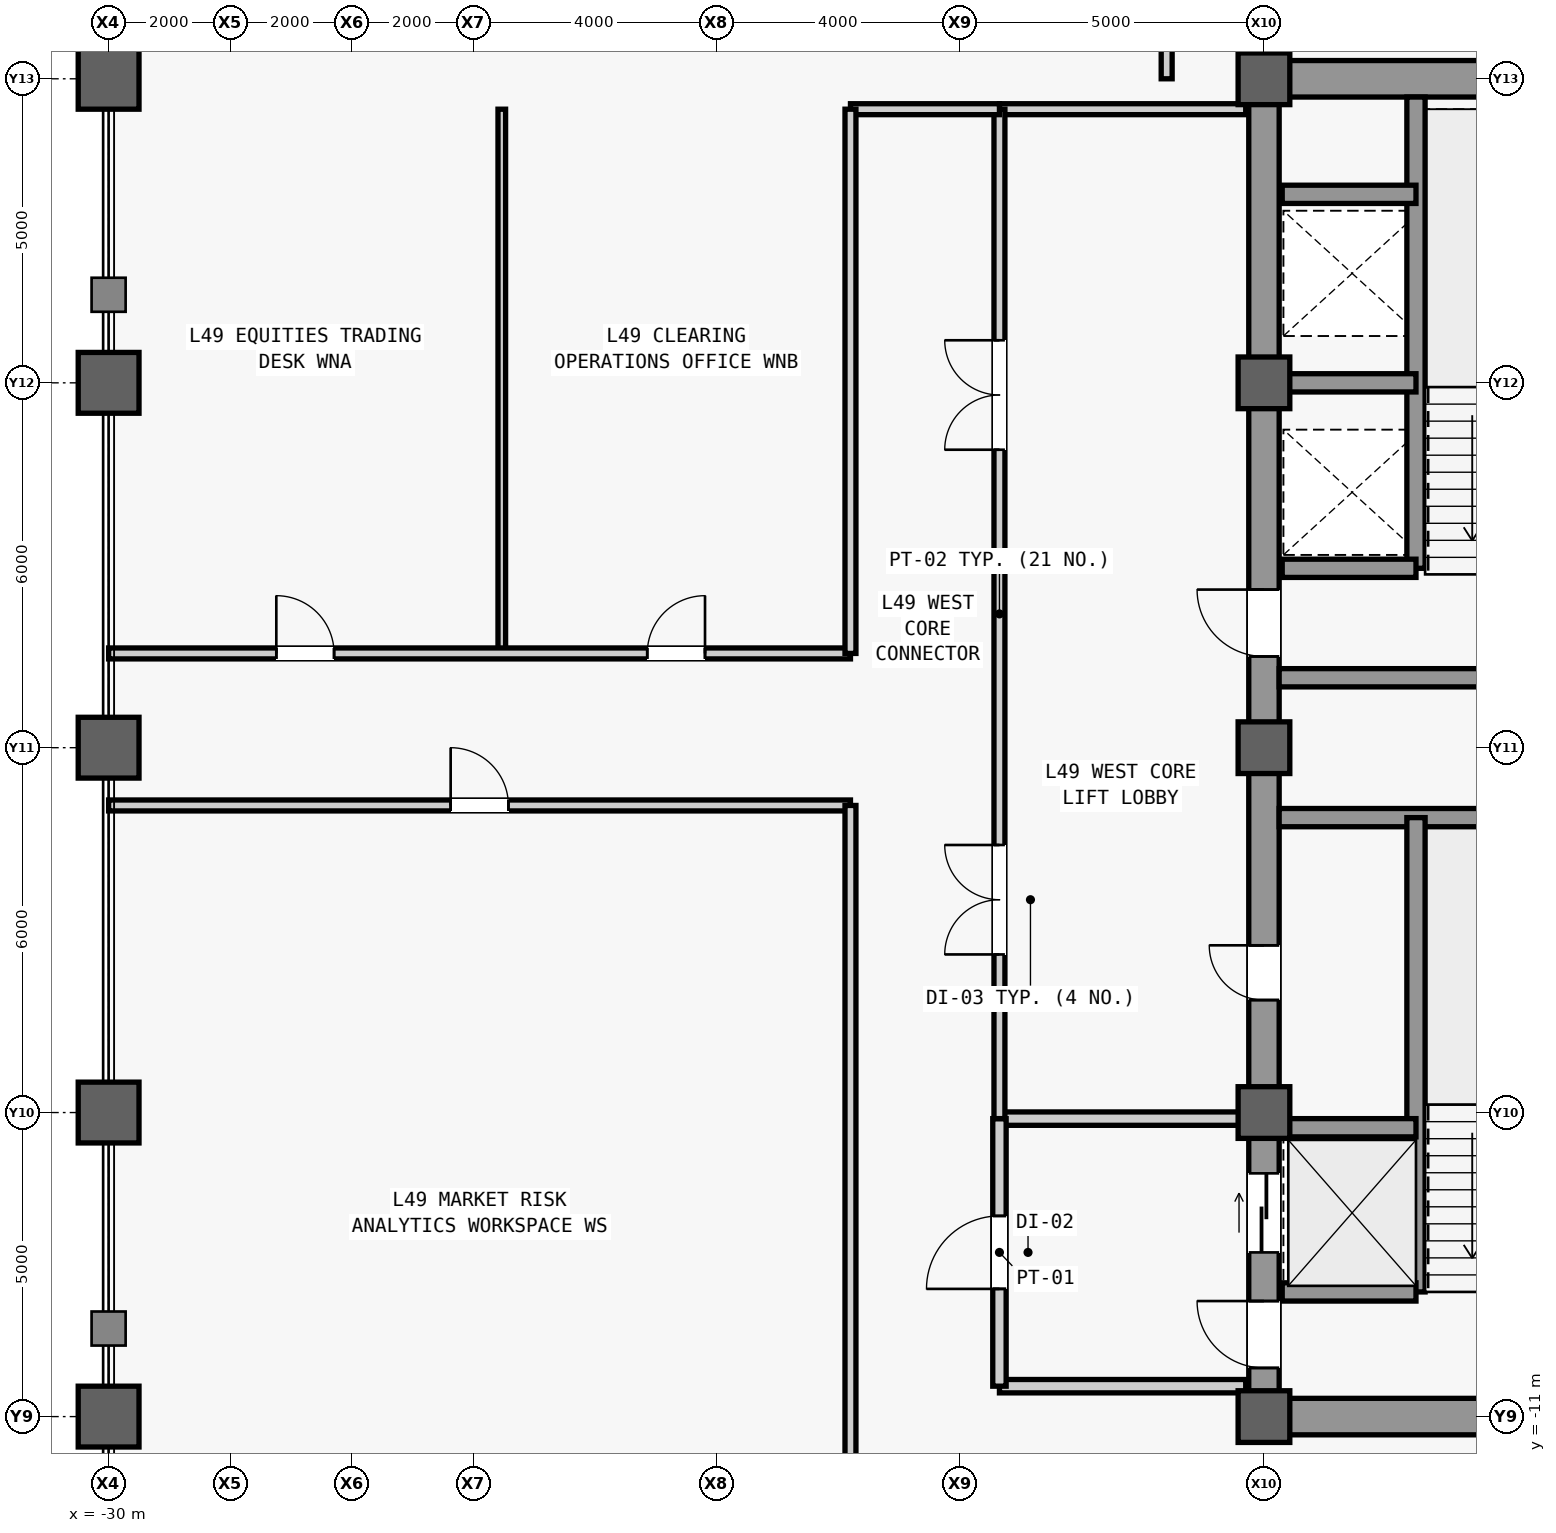
"""IFC4 building model, lengths in metres.
Left out: names, types, materials, properties, quantities, classifications, styles, units other than length and angle.
Written with IfcOpenShell. Run it as: python <this file> out.ifc"""

import sys

from ifc_helpers import new_model, si_unit, direction, frame, frame_2d, origin, origin_2d, place, context, subcontext, project, spatial, rectangle, hollow_rectangle, extrude, source, transform, mapped, element, fill, save


model = new_model("IFC4")
c1 = context("Model", 3, precision=1e-05, world=origin(), true_north=direction((0.0, 1.0)))
c2 = subcontext(c1, "Body", "Model", "MODEL_VIEW")
j1 = project(units=[si_unit("LENGTHUNIT", "METRE"), si_unit("PLANEANGLEUNIT", "RADIAN")], contexts=[c1])
p1 = place(None, origin())
s1 = spatial("IfcSite", under=j1, at=p1, CompositionType="ELEMENT")
p2 = place(p1, origin())
s2 = spatial("IfcBuilding", under=s1, at=p2, CompositionType="ELEMENT")
p3 = place(p2, frame((0.0, 0.0, 211.1)))
s3 = spatial("IfcBuildingStorey", under=s2, at=p3, CompositionType="ELEMENT", Elevation=211.1)
m1 = source(origin(), c2, "Body", "SweptSolid", [
    extrude(rectangle(XDim=22.0, YDim=0.5, at=frame_2d((11.0, 0.0))), origin(), (0.0, 0.0, 1.0), 3.78),
])
p4 = place(p3, frame((-11.0, -11.0, 0.0), z_axis=(0.0, 0.0, 1.0), x_axis=(0.0, 1.0, 0.0)))
e1 = element("IfcWall", 1, at=p4, inside=s3, PredefinedType="SHEAR", context=c2, shape_type="MappedRepresentation", body=[
    mapped(m1, transform((0.0, 0.0, 0.0), scale=1.0)),
])
m2 = source(origin(), c2, "Body", "SweptSolid", [
    extrude(rectangle(XDim=1.1, YDim=2.2, at=frame_2d((0.55, 1.1))), frame((0.0, 0.26, 0.0), z_axis=(0.0, -1.0, 0.0), x_axis=(1.0, 0.0, 0.0)), (0.0, 0.0, 1.0), 0.52),
])
p5 = place(p4, frame((0.8, 0.0, 0.0)))
e2 = element("IfcOpeningElement", 2, at=p5, cuts=e1, PredefinedType="OPENING", context=c2, shape_type="MappedRepresentation", body=[
    mapped(m2, transform((0.0, 0.0, 0.0), scale=1.0)),
])
p6 = place(p4, frame((12.5, 0.0, 0.0)))
e3 = element("IfcOpeningElement", 3, at=p6, cuts=e1, PredefinedType="OPENING", context=c2, shape_type="MappedRepresentation", body=[
    mapped(m2, transform((0.0, 0.0, 0.0), scale=1.0)),
])
m3 = source(origin(), c2, "Body", "SweptSolid", [
    extrude(rectangle(XDim=0.9, YDim=2.15, at=frame_2d((0.45, 1.075))), frame((0.0, 0.26, 0.0), z_axis=(0.0, -1.0, 0.0), x_axis=(1.0, 0.0, 0.0)), (0.0, 0.0, 1.0), 0.52),
])
p7 = place(p4, frame((6.85, 0.0, 0.0)))
e4 = element("IfcOpeningElement", 4, at=p7, cuts=e1, PredefinedType="OPENING", context=c2, shape_type="MappedRepresentation", body=[
    mapped(m3, transform((0.0, 0.0, 0.0), scale=1.0)),
])
m4 = source(origin(), c2, "Body", "SweptSolid", [
    extrude(rectangle(XDim=1.3, YDim=2.3, at=frame_2d((0.65, 1.15))), frame((0.0, 0.26, 0.0), z_axis=(0.0, -1.0, 0.0), x_axis=(1.0, 0.0, 0.0)), (0.0, 0.0, 1.0), 0.52),
])
p8 = place(p4, frame((2.7, 0.0, 0.0)))
e5 = element("IfcOpeningElement", 5, at=p8, cuts=e1, PredefinedType="OPENING", context=c2, shape_type="MappedRepresentation", body=[
    mapped(m4, transform((0.0, 0.0, 0.0), scale=1.0)),
])
m5 = source(origin(), c2, "Body", "SweptSolid", [
    extrude(rectangle(XDim=5.9, YDim=0.6, at=frame_2d((2.95, 0.0))), origin(), (0.0, 0.0, 1.0), 3.78),
])
for number, where, z_axis, x_axis in (
    (6, (-10.75, -11.0, 0.0), (0.0, 0.0, 1.0), (1.0, 0.0, 0.0)),
    (7, (-10.75, 11.0, 0.0), (0.0, 0.0, 1.0), (1.0, 0.0, 0.0)),
):
    element("IfcWall", number, at=place(p3, frame(where, z_axis=z_axis, x_axis=x_axis)), inside=s3, PredefinedType="SHEAR", context=c2, shape_type="MappedRepresentation", body=[
        mapped(m5, transform((0.0, 0.0, 0.0), scale=1.0)),
    ])
m6 = source(origin(), c2, "Body", "SweptSolid", [
    extrude(rectangle(XDim=5.65, YDim=0.3, at=frame_2d((2.825, 0.0))), origin(), (0.0, 0.0, 1.0), 3.78),
])
for number, where, z_axis, x_axis in (
    (8, (-10.75, -1.15, 0.0), (0.0, 0.0, 1.0), (1.0, 0.0, 0.0)),
    (9, (-10.75, 1.15, 0.0), (0.0, 0.0, 1.0), (1.0, 0.0, 0.0)),
):
    element("IfcWall", number, at=place(p3, frame(where, z_axis=z_axis, x_axis=x_axis)), inside=s3, PredefinedType="SHEAR", context=c2, shape_type="MappedRepresentation", body=[
        mapped(m6, transform((0.0, 0.0, 0.0), scale=1.0)),
    ])
m7 = source(origin(), c2, "Body", "SweptSolid", [
    extrude(hollow_rectangle(XDim=1.0, YDim=1.0, WallThickness=0.055, at=origin_2d()), origin(), (0.0, 0.0, 1.0), 4.0),
])
for number, where, z_axis, x_axis in (
    (10, (-30.0, -11.0, 0.0), (0.0, 0.0, 1.0), (1.0, 0.0, 0.0)),
    (11, (-30.0, -6.0, 0.0), (0.0, 0.0, 1.0), (1.0, 0.0, 0.0)),
    (12, (-30.0, 0.0, 0.0), (0.0, 0.0, 1.0), (1.0, 0.0, 0.0)),
    (13, (-30.0, 6.0, 0.0), (0.0, 0.0, 1.0), (1.0, 0.0, 0.0)),
    (14, (-30.0, 11.0, 0.0), (0.0, 0.0, 1.0), (1.0, 0.0, 0.0)),
):
    element("IfcColumn", number, at=place(p3, frame(where, z_axis=z_axis, x_axis=x_axis)), inside=s3, PredefinedType="COLUMN", context=c2, shape_type="MappedRepresentation", body=[
        mapped(m7, transform((0.0, 0.0, 0.0), scale=1.0)),
    ])
m8 = source(origin(), c2, "Body", "SweptSolid", [
    extrude(rectangle(XDim=0.85, YDim=0.85, at=origin_2d()), origin(), (0.0, 0.0, 1.0), 4.0),
])
for number, where, z_axis, x_axis in (
    (15, (-11.0, -11.0, 0.0), (0.0, 0.0, 1.0), (1.0, 0.0, 0.0)),
    (16, (-11.0, -6.0, 0.0), (0.0, 0.0, 1.0), (1.0, 0.0, 0.0)),
    (17, (-11.0, 0.0, 0.0), (0.0, 0.0, 1.0), (1.0, 0.0, 0.0)),
    (18, (-11.0, 6.0, 0.0), (0.0, 0.0, 1.0), (1.0, 0.0, 0.0)),
    (19, (-11.0, 11.0, 0.0), (0.0, 0.0, 1.0), (1.0, 0.0, 0.0)),
):
    element("IfcColumn", number, at=place(p3, frame(where, z_axis=z_axis, x_axis=x_axis)), inside=s3, PredefinedType="COLUMN", context=c2, shape_type="MappedRepresentation", body=[
        mapped(m8, transform((0.0, 0.0, 0.0), scale=1.0)),
    ])
m9 = source(origin(), c2, "Body", "SweptSolid", [
    extrude(rectangle(XDim=7.8, YDim=0.3, at=frame_2d((3.9, 0.0))), origin(), (0.0, 0.0, 1.0), 3.78),
])
p9 = place(p3, frame((-8.5, -8.95, 0.0), z_axis=(0.0, 0.0, 1.0), x_axis=(0.0, 1.0, 0.0)))
e20 = element("IfcWall", 20, at=p9, inside=s3, PredefinedType="SHEAR", context=c2, shape_type="MappedRepresentation", body=[
    mapped(m9, transform((0.0, 0.0, 0.0), scale=1.0)),
])
m10 = source(origin(), c2, "Body", "SweptSolid", [
    extrude(rectangle(XDim=2.2, YDim=0.3, at=frame_2d((1.1, 0.0))), origin(), (0.0, 0.0, 1.0), 3.78),
])
for number, where, z_axis, x_axis in (
    (21, (-10.7, -8.95, 0.0), (0.0, 0.0, 1.0), (1.0, 0.0, 0.0)),
    (22, (-10.7, -6.25, 0.0), (0.0, 0.0, 1.0), (1.0, 0.0, 0.0)),
):
    element("IfcWall", number, at=place(p3, frame(where, z_axis=z_axis, x_axis=x_axis)), inside=s3, PredefinedType="SHEAR", context=c2, shape_type="MappedRepresentation", body=[
        mapped(m10, transform((0.0, 0.0, 0.0), scale=1.0)),
    ])
m11 = source(origin(), c2, "Body", "SweptSolid", [
    extrude(rectangle(XDim=7.75, YDim=0.3, at=frame_2d((3.875, 0.0))), origin(), (0.0, 0.0, 1.0), 3.78),
])
p10 = place(p3, frame((-8.5, 2.95, 0.0), z_axis=(0.0, 0.0, 1.0), x_axis=(0.0, 1.0, 0.0)))
e23 = element("IfcWall", 23, at=p10, inside=s3, PredefinedType="SHEAR", context=c2, shape_type="MappedRepresentation", body=[
    mapped(m11, transform((0.0, 0.0, 0.0), scale=1.0)),
])
for number, where, z_axis, x_axis in (
    (24, (-10.7, 2.95, 0.0), (0.0, 0.0, 1.0), (1.0, 0.0, 0.0)),
    (25, (-10.7, 6.0, 0.0), (0.0, 0.0, 1.0), (1.0, 0.0, 0.0)),
    (26, (-10.7, 9.1, 0.0), (0.0, 0.0, 1.0), (1.0, 0.0, 0.0)),
):
    element("IfcWall", number, at=place(p3, frame(where, z_axis=z_axis, x_axis=x_axis)), inside=s3, PredefinedType="SHEAR", context=c2, shape_type="MappedRepresentation", body=[
        mapped(m10, transform((0.0, 0.0, 0.0), scale=1.0)),
    ])
m12 = source(origin(), c2, "Body", "SweptSolid", [
    extrude(rectangle(XDim=4.05, YDim=0.22, at=frame_2d((2.025, 0.0))), origin(), (0.0, 0.0, 1.0), 3.78),
])
p11 = place(p3, frame((-15.35, -10.5, 0.0), z_axis=(0.0, 0.0, 1.0), x_axis=(1.0, 0.0, 0.0)))
e27 = element("IfcWall", 27, at=p11, inside=s3, PredefinedType="PARTITIONING", context=c2, shape_type="MappedRepresentation", body=[
    mapped(m12, transform((0.0, 0.0, 0.0), scale=1.0)),
])
m13 = source(origin(), c2, "Body", "SweptSolid", [
    extrude(rectangle(XDim=4.05, YDim=0.22, at=frame_2d((2.025, 0.0))), origin(), (0.0, 0.0, 1.0), 3.085),
])
p12 = place(p3, frame((-15.35, -6.1, 0.0), z_axis=(0.0, 0.0, 1.0), x_axis=(1.0, 0.0, 0.0)))
e28 = element("IfcWall", 28, at=p12, inside=s3, PredefinedType="PARTITIONING", context=c2, shape_type="MappedRepresentation", body=[
    mapped(m13, transform((0.0, 0.0, 0.0), scale=1.0)),
])
m14 = source(origin(), c2, "Body", "SweptSolid", [
    extrude(rectangle(XDim=4.4, YDim=0.22, at=frame_2d((2.2, 0.0))), origin(), (0.0, 0.0, 1.0), 3.78),
])
p13 = place(p3, frame((-15.35, -10.5, 0.0), z_axis=(0.0, 0.0, 1.0), x_axis=(0.0, 1.0, 0.0)))
e29 = element("IfcWall", 29, at=p13, inside=s3, PredefinedType="PARTITIONING", context=c2, shape_type="MappedRepresentation", body=[
    mapped(m14, transform((0.0, 0.0, 0.0), scale=1.0)),
])
m15 = source(origin(), c2, "Body", "SweptSolid", [
    extrude(rectangle(XDim=1.2, YDim=2.2, at=frame_2d((0.6, 1.1))), frame((0.0, 0.12, 0.0), z_axis=(0.0, -1.0, 0.0), x_axis=(1.0, 0.0, 0.0)), (0.0, 0.0, 1.0), 0.24),
])
p14 = place(p13, frame((1.6, 0.0, 0.0)))
e30 = element("IfcOpeningElement", 30, at=p14, cuts=e29, PredefinedType="OPENING", context=c2, shape_type="MappedRepresentation", body=[
    mapped(m15, transform((0.0, 0.0, 0.0), scale=1.0)),
])
m16 = source(origin(), c2, "Body", "SweptSolid", [
    extrude(rectangle(XDim=4.05, YDim=0.18, at=frame_2d((2.025, 0.0))), origin(), (0.0, 0.0, 1.0), 3.78),
])
p15 = place(p3, frame((-15.35, 10.5, 0.0), z_axis=(0.0, 0.0, 1.0), x_axis=(1.0, 0.0, 0.0)))
e31 = element("IfcWall", 31, at=p15, inside=s3, PredefinedType="PARTITIONING", context=c2, shape_type="MappedRepresentation", body=[
    mapped(m16, transform((0.0, 0.0, 0.0), scale=1.0)),
])
m17 = source(origin(), c2, "Body", "SweptSolid", [
    extrude(rectangle(XDim=16.6, YDim=0.18, at=frame_2d((8.3, 0.0))), origin(), (0.0, 0.0, 1.0), 3.78),
])
p16 = place(p3, frame((-15.35, -6.1, 0.0), z_axis=(0.0, 0.0, 1.0), x_axis=(0.0, 1.0, 0.0)))
e32 = element("IfcWall", 32, at=p16, inside=s3, PredefinedType="PARTITIONING", context=c2, shape_type="MappedRepresentation", body=[
    mapped(m17, transform((0.0, 0.0, 0.0), scale=1.0)),
])
m18 = source(origin(), c2, "Body", "SweptSolid", [
    extrude(rectangle(XDim=1.8, YDim=2.25, at=frame_2d((0.9, 1.125))), frame((0.0, 0.1, 0.0), z_axis=(0.0, -1.0, 0.0), x_axis=(1.0, 0.0, 0.0)), (0.0, 0.0, 1.0), 0.2),
])
p17 = place(p16, frame((2.7, 0.0, 0.0)))
e33 = element("IfcOpeningElement", 33, at=p17, cuts=e32, PredefinedType="OPENING", context=c2, shape_type="MappedRepresentation", body=[
    mapped(m18, transform((0.0, 0.0, 0.0), scale=1.0)),
])
p18 = place(p16, frame((11.0, 0.0, 0.0)))
e34 = element("IfcOpeningElement", 34, at=p18, cuts=e32, PredefinedType="OPENING", context=c2, shape_type="MappedRepresentation", body=[
    mapped(m18, transform((0.0, 0.0, 0.0), scale=1.0)),
])
m19 = source(origin(), c2, "Body", "SweptSolid", [
    extrude(rectangle(XDim=2.45, YDim=0.18, at=frame_2d((1.225, 0.0))), origin(), (0.0, 0.0, 1.0), 3.78),
])
p19 = place(p3, frame((-17.8, 10.5, 0.0), z_axis=(0.0, 0.0, 1.0), x_axis=(1.0, 0.0, 0.0)))
e35 = element("IfcWall", 35, at=p19, inside=s3, PredefinedType="PARTITIONING", context=c2, shape_type="MappedRepresentation", body=[
    mapped(m19, transform((0.0, 0.0, 0.0), scale=1.0)),
])
m20 = source(origin(), c2, "Body", "SweptSolid", [
    extrude(rectangle(XDim=2.5, YDim=0.18, at=frame_2d((1.25, 0.0))), origin(), (0.0, 0.0, 1.0), 3.78),
])
p20 = place(p3, frame((-12.6, 11.0, 0.0), z_axis=(0.0, 0.0, 1.0), x_axis=(0.0, 1.0, 0.0)))
e36 = element("IfcWall", 36, at=p20, inside=s3, PredefinedType="PARTITIONING", context=c2, shape_type="MappedRepresentation", body=[
    mapped(m20, transform((0.0, 0.0, 0.0), scale=1.0)),
])
m21 = source(origin(), c2, "Body", "SweptSolid", [
    extrude(rectangle(XDim=12.2, YDim=0.18, at=frame_2d((6.1, 0.0))), origin(), (0.0, 0.0, 1.0), 3.78),
])
p21 = place(p3, frame((-30.0, -0.95, 0.0), z_axis=(0.0, 0.0, 1.0), x_axis=(1.0, 0.0, 0.0)))
e37 = element("IfcWall", 37, at=p21, inside=s3, PredefinedType="PARTITIONING", context=c2, shape_type="MappedRepresentation", body=[
    mapped(m21, transform((0.0, 0.0, 0.0), scale=1.0)),
])
m22 = source(origin(), c2, "Body", "SweptSolid", [
    extrude(rectangle(XDim=0.95, YDim=2.15, at=frame_2d((0.475, 1.075))), frame((0.0, 0.1, 0.0), z_axis=(0.0, -1.0, 0.0), x_axis=(1.0, 0.0, 0.0)), (0.0, 0.0, 1.0), 0.2),
])
p22 = place(p21, frame((5.625, 0.0, 0.0)))
e38 = element("IfcOpeningElement", 38, at=p22, cuts=e37, PredefinedType="OPENING", context=c2, shape_type="MappedRepresentation", body=[
    mapped(m22, transform((0.0, 0.0, 0.0), scale=1.0)),
])
m23 = source(origin(), c2, "Body", "SweptSolid", [
    extrude(rectangle(XDim=13.25, YDim=0.18, at=frame_2d((6.625, 0.0))), origin(), (0.0, 0.0, 1.0), 3.78),
])
p23 = place(p3, frame((-17.8, -14.2, 0.0), z_axis=(0.0, 0.0, 1.0), x_axis=(0.0, 1.0, 0.0)))
e39 = element("IfcWall", 39, at=p23, inside=s3, PredefinedType="PARTITIONING", context=c2, shape_type="MappedRepresentation", body=[
    mapped(m23, transform((0.0, 0.0, 0.0), scale=1.0)),
])
m24 = source(origin(), c2, "Body", "SweptSolid", [
    extrude(rectangle(XDim=8.95, YDim=0.125, at=frame_2d((4.475, 0.0))), origin(), (0.0, 0.0, 1.0), 3.78),
])
p24 = place(p3, frame((-23.534, 1.55, 0.0), z_axis=(0.0, 0.0, 1.0), x_axis=(0.0, 1.0, 0.0)))
e40 = element("IfcWall", 40, at=p24, inside=s3, PredefinedType="PARTITIONING", context=c2, shape_type="MappedRepresentation", body=[
    mapped(m24, transform((0.0, 0.0, 0.0), scale=1.0)),
])
p25 = place(p3, frame((-30.0, 1.55, 0.0), z_axis=(0.0, 0.0, 1.0), x_axis=(1.0, 0.0, 0.0)))
e41 = element("IfcWall", 41, at=p25, inside=s3, PredefinedType="PARTITIONING", context=c2, shape_type="MappedRepresentation", body=[
    mapped(m21, transform((0.0, 0.0, 0.0), scale=1.0)),
])
p26 = place(p25, frame((2.758, 0.0, 0.0)))
e42 = element("IfcOpeningElement", 42, at=p26, cuts=e41, PredefinedType="OPENING", context=c2, shape_type="MappedRepresentation", body=[
    mapped(m22, transform((0.0, 0.0, 0.0), scale=1.0)),
])
p27 = place(p25, frame((8.858, 0.0, 0.0)))
e43 = element("IfcOpeningElement", 43, at=p27, cuts=e41, PredefinedType="OPENING", context=c2, shape_type="MappedRepresentation", body=[
    mapped(m22, transform((0.0, 0.0, 0.0), scale=1.0)),
])
m25 = source(origin(), c2, "Body", "SweptSolid", [
    extrude(rectangle(XDim=8.95, YDim=0.18, at=frame_2d((4.475, 0.0))), origin(), (0.0, 0.0, 1.0), 3.78),
])
p28 = place(p3, frame((-17.8, 1.55, 0.0), z_axis=(0.0, 0.0, 1.0), x_axis=(0.0, 1.0, 0.0)))
e44 = element("IfcWall", 44, at=p28, inside=s3, PredefinedType="PARTITIONING", context=c2, shape_type="MappedRepresentation", body=[
    mapped(m25, transform((0.0, 0.0, 0.0), scale=1.0)),
])
m26 = source(origin(), c2, "Body", "SweptSolid", [
    extrude(rectangle(XDim=1.1, YDim=2.2, at=frame_2d((0.55, 1.1))), frame((0.0, 0.025, 0.0), z_axis=(0.0, -1.0, 0.0), x_axis=(1.0, 0.0, 0.0)), (0.0, 0.0, 1.0), 0.05),
])
p29 = place(p5, origin())
e45 = element("IfcDoor", 45, at=p29, inside=s3, OperationType="SINGLE_SWING_RIGHT", PredefinedType="DOOR", context=c2, shape_type="MappedRepresentation", body=[
    mapped(m26, transform((0.0, 0.0, 0.0), scale=1.0)),
])
fill(e2, e45)
p30 = place(p6, origin())
e46 = element("IfcDoor", 46, at=p30, inside=s3, OperationType="SINGLE_SWING_RIGHT", PredefinedType="DOOR", context=c2, shape_type="MappedRepresentation", body=[
    mapped(m26, transform((0.0, 0.0, 0.0), scale=1.0)),
])
fill(e3, e46)
m27 = source(origin(), c2, "Body", "SweptSolid", [
    extrude(rectangle(XDim=0.9, YDim=2.15, at=frame_2d((0.45, 1.075))), frame((0.0, 0.025, 0.0), z_axis=(0.0, -1.0, 0.0), x_axis=(1.0, 0.0, 0.0)), (0.0, 0.0, 1.0), 0.05),
])
p31 = place(p7, origin())
e47 = element("IfcDoor", 47, at=p31, inside=s3, OperationType="SINGLE_SWING_RIGHT", PredefinedType="DOOR", context=c2, shape_type="MappedRepresentation", body=[
    mapped(m27, transform((0.0, 0.0, 0.0), scale=1.0)),
])
fill(e4, e47)
m28 = source(origin(), c2, "Body", "SweptSolid", [
    extrude(rectangle(XDim=1.2, YDim=2.2, at=frame_2d((0.6, 1.1))), frame((0.0, 0.025, 0.0), z_axis=(0.0, -1.0, 0.0), x_axis=(1.0, 0.0, 0.0)), (0.0, 0.0, 1.0), 0.05),
])
p32 = place(p14, origin())
e48 = element("IfcDoor", 48, at=p32, inside=s3, OperationType="SINGLE_SWING_LEFT", PredefinedType="DOOR", context=c2, shape_type="MappedRepresentation", body=[
    mapped(m28, transform((0.0, 0.0, 0.0), scale=1.0)),
])
fill(e30, e48)
m29 = source(origin(), c2, "Body", "SweptSolid", [
    extrude(rectangle(XDim=1.8, YDim=2.25, at=frame_2d((0.9, 1.125))), frame((0.0, 0.025, 0.0), z_axis=(0.0, -1.0, 0.0), x_axis=(1.0, 0.0, 0.0)), (0.0, 0.0, 1.0), 0.05),
])
p33 = place(p17, origin())
e49 = element("IfcDoor", 49, at=p33, inside=s3, OperationType="SINGLE_SWING_LEFT", PredefinedType="DOOR", context=c2, shape_type="MappedRepresentation", body=[
    mapped(m29, transform((0.0, 0.0, 0.0), scale=1.0)),
])
fill(e33, e49)
p34 = place(p18, origin())
e50 = element("IfcDoor", 50, at=p34, inside=s3, OperationType="SINGLE_SWING_RIGHT", PredefinedType="DOOR", context=c2, shape_type="MappedRepresentation", body=[
    mapped(m29, transform((0.0, 0.0, 0.0), scale=1.0)),
])
fill(e34, e50)
m30 = source(origin(), c2, "Body", "SweptSolid", [
    extrude(rectangle(XDim=0.95, YDim=2.15, at=frame_2d((0.475, 1.075))), frame((0.0, 0.025, 0.0), z_axis=(0.0, -1.0, 0.0), x_axis=(1.0, 0.0, 0.0)), (0.0, 0.0, 1.0), 0.05),
])
p35 = place(p22, origin())
e51 = element("IfcDoor", 51, at=p35, inside=s3, OperationType="SINGLE_SWING_LEFT", PredefinedType="DOOR", context=c2, shape_type="MappedRepresentation", body=[
    mapped(m30, transform((0.0, 0.0, 0.0), scale=1.0)),
])
fill(e38, e51)
p36 = place(p26, origin())
e52 = element("IfcDoor", 52, at=p36, inside=s3, OperationType="SINGLE_SWING_LEFT", PredefinedType="DOOR", context=c2, shape_type="MappedRepresentation", body=[
    mapped(m30, transform((0.0, 0.0, 0.0), scale=1.0)),
])
fill(e42, e52)
p37 = place(p27, origin())
e53 = element("IfcDoor", 53, at=p37, inside=s3, OperationType="SINGLE_SWING_RIGHT", PredefinedType="DOOR", context=c2, shape_type="MappedRepresentation", body=[
    mapped(m30, transform((0.0, 0.0, 0.0), scale=1.0)),
])
fill(e43, e53)
m31 = source(origin(), c2, "Body", "SweptSolid", [
    extrude(rectangle(XDim=1.3, YDim=2.3, at=frame_2d((0.65, 1.15))), frame((0.0, 0.025, 0.0), z_axis=(0.0, -1.0, 0.0), x_axis=(1.0, 0.0, 0.0)), (0.0, 0.0, 1.0), 0.05),
])
p38 = place(p8, origin())
e54 = element("IfcDoor", 54, at=p38, inside=s3, OperationType="SLIDING_TO_LEFT", PredefinedType="DOOR", context=c2, shape_type="MappedRepresentation", body=[
    mapped(m31, transform((0.0, 0.0, 0.0), scale=1.0)),
])
fill(e5, e54)
save(model, sys.argv[1])
